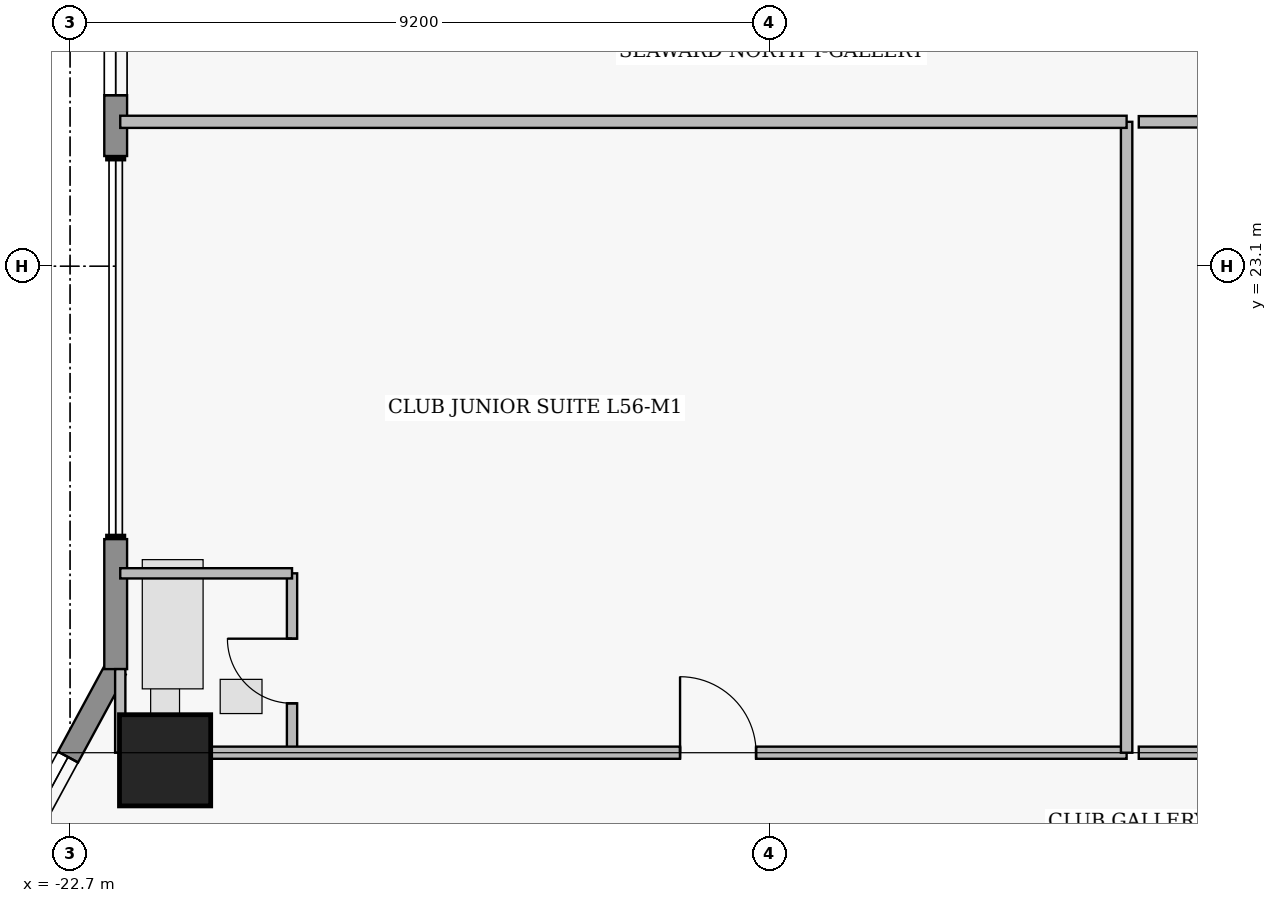
"""IFC4 building model, lengths in metres.
Left out: names, types, materials, properties, quantities, classifications, styles, units other than length and angle.
Written with IfcOpenShell. Run it as: python <this file> out.ifc"""

import sys

from ifc_helpers import new_model, si_unit, direction, frame, frame_2d, origin, origin_2d, place, context, subcontext, project, spatial, rectangle, extrude, element, fill, save


model = new_model("IFC4")
c1 = context("Model", 3, precision=1e-05, world=origin(), true_north=direction((0.0, 1.0)))
c2 = subcontext(c1, "Body", "Model", "MODEL_VIEW")
j1 = project(units=[si_unit("LENGTHUNIT", "METRE"), si_unit("PLANEANGLEUNIT", "RADIAN")], contexts=[c1])
p1 = place(None, origin())
s1 = spatial("IfcSite", under=j1, at=p1, CompositionType="ELEMENT")
p2 = place(p1, origin())
s2 = spatial("IfcBuilding", under=s1, at=p2, CompositionType="ELEMENT")
p3 = place(p2, frame((0.0, 0.0, 222.4)))
s3 = spatial("IfcBuildingStorey", under=s2, at=p3, CompositionType="ELEMENT", Elevation=222.4)
p4 = place(p3, frame((-21.45, 16.6, 0.0), z_axis=(0.0, 0.0, 1.0), x_axis=(1.0, 0.0, 0.0)))
e1 = element("IfcColumn", 1, at=p4, inside=s3, PredefinedType="COLUMN", context=c2, shape_type="SweptSolid", body=[
    extrude(rectangle(XDim=1.2, YDim=1.2, at=origin_2d()), origin(), (0.0, 0.0, 1.0), 3.75),
])
p5 = place(p3, frame((-24.7, 13.0, 0.0), z_axis=(0.0, 0.0, 1.0), x_axis=(0.476258655584, 0.879305233114, 0.0)))
e2 = element("IfcWall", 2, at=p5, inside=s3, PredefinedType="STANDARD", context=c2, shape_type="SweptSolid", body=[
    extrude(rectangle(XDim=5.459, YDim=0.3, at=frame_2d((2.729, 0.0))), origin(), (0.0, 0.0, 1.0), 3.53),
])
p6 = place(p5, frame((2.993, 0.0, 1.25)))
e3 = element("IfcOpeningElement", 3, at=p6, cuts=e2, PredefinedType="OPENING", context=c2, shape_type="SweptSolid", body=[
    extrude(rectangle(XDim=1.15, YDim=1.55, at=frame_2d((0.575, 0.775))), frame((0.0, 0.16, 0.0), z_axis=(0.0, -1.0, 0.0), x_axis=(1.0, 0.0, 0.0)), (0.0, 0.0, 1.0), 0.32),
])
p7 = place(p3, frame((-22.1, 17.8, 0.0), z_axis=(0.0, 0.0, 1.0), x_axis=(0.0, 1.0, 0.0)))
e4 = element("IfcWall", 4, at=p7, inside=s3, PredefinedType="STANDARD", context=c2, shape_type="SweptSolid", body=[
    extrude(rectangle(XDim=1.71, YDim=0.3, at=frame_2d((0.855, 0.0))), origin(), (0.0, 0.0, 1.0), 3.53),
])
p8 = place(p3, frame((-22.1, 24.55, 0.0), z_axis=(0.0, 0.0, 1.0), x_axis=(0.0, 1.0, 0.0)))
e5 = element("IfcWall", 5, at=p8, inside=s3, PredefinedType="STANDARD", context=c2, shape_type="SweptSolid", body=[
    extrude(rectangle(XDim=5.65, YDim=0.3, at=frame_2d((2.825, 0.0))), origin(), (0.0, 0.0, 1.0), 3.53),
])
p9 = place(p8, frame((0.8, 0.0, 0.95)))
e6 = element("IfcOpeningElement", 6, at=p9, cuts=e5, PredefinedType="OPENING", context=c2, shape_type="SweptSolid", body=[
    extrude(rectangle(XDim=1.15, YDim=1.55, at=frame_2d((0.575, 0.775))), frame((0.0, 0.16, 0.0), z_axis=(0.0, -1.0, 0.0), x_axis=(1.0, 0.0, 0.0)), (0.0, 0.0, 1.0), 0.32),
])
p10 = place(p8, frame((2.905, 0.0, 0.95)))
e7 = element("IfcOpeningElement", 7, at=p10, cuts=e5, PredefinedType="OPENING", context=c2, shape_type="SweptSolid", body=[
    extrude(rectangle(XDim=1.15, YDim=1.55, at=frame_2d((0.575, 0.775))), frame((0.0, 0.16, 0.0), z_axis=(0.0, -1.0, 0.0), x_axis=(1.0, 0.0, 0.0)), (0.0, 0.0, 1.0), 0.32),
])
p11 = place(p3, frame((-19.78, 16.7, 0.0), z_axis=(0.0, 0.0, 1.0), x_axis=(0.0, 1.0, 0.0)))
e8 = element("IfcWall", 8, at=p11, inside=s3, PredefinedType="PLUMBINGWALL", context=c2, shape_type="SweptSolid", body=[
    extrude(rectangle(XDim=2.36, YDim=0.135, at=frame_2d((1.18, 0.0))), origin(), (0.0, 0.0, 1.0), 3.53),
])
p12 = place(p11, frame((0.65, 0.0, 0.0)))
e9 = element("IfcOpeningElement", 9, at=p12, cuts=e8, PredefinedType="OPENING", context=c2, shape_type="SweptSolid", body=[
    extrude(rectangle(XDim=0.85, YDim=2.1, at=frame_2d((0.425, 1.05))), frame((0.0, 0.077, 0.0), z_axis=(0.0, -1.0, 0.0), x_axis=(1.0, 0.0, 0.0)), (0.0, 0.0, 1.0), 0.155),
])
p13 = place(p3, frame((-22.04, 16.7, 0.0), z_axis=(0.0, 0.0, 1.0), x_axis=(1.0, 0.0, 0.0)))
e10 = element("IfcWall", 10, at=p13, inside=s3, PredefinedType="PARTITIONING", context=c2, shape_type="SweptSolid", body=[
    extrude(rectangle(XDim=13.24, YDim=0.16, at=frame_2d((6.62, 0.0))), origin(), (0.0, 0.0, 1.0), 3.124),
])
p14 = place(p13, frame((7.365, 0.0, 0.0)))
e11 = element("IfcOpeningElement", 11, at=p14, cuts=e10, PredefinedType="OPENING", context=c2, shape_type="SweptSolid", body=[
    extrude(rectangle(XDim=1.0, YDim=2.15, at=frame_2d((0.5, 1.075))), frame((0.0, 0.09, 0.0), z_axis=(0.0, -1.0, 0.0), x_axis=(1.0, 0.0, 0.0)), (0.0, 0.0, 1.0), 0.18),
])
p15 = place(p3, frame((-8.64, 16.7, 0.0), z_axis=(0.0, 0.0, 1.0), x_axis=(1.0, 0.0, 0.0)))
e12 = element("IfcWall", 12, at=p15, inside=s3, PredefinedType="PARTITIONING", context=c2, shape_type="SweptSolid", body=[
    extrude(rectangle(XDim=7.66, YDim=0.16, at=frame_2d((3.83, 0.0))), origin(), (0.0, 0.0, 1.0), 3.124),
])
p16 = place(p15, frame((5.85, 0.0, 0.0)))
e13 = element("IfcOpeningElement", 13, at=p16, cuts=e12, PredefinedType="OPENING", context=c2, shape_type="SweptSolid", body=[
    extrude(rectangle(XDim=1.08, YDim=2.18, at=frame_2d((0.54, 1.09))), frame((0.0, 0.09, 0.0), z_axis=(0.0, -1.0, 0.0), x_axis=(1.0, 0.0, 0.0)), (0.0, 0.0, 1.0), 0.18),
])
p17 = place(p3, frame((-22.04, 19.06, 0.0), z_axis=(0.0, 0.0, 1.0), x_axis=(1.0, 0.0, 0.0)))
e14 = element("IfcWall", 14, at=p17, inside=s3, PredefinedType="PLUMBINGWALL", context=c2, shape_type="SweptSolid", body=[
    extrude(rectangle(XDim=2.26, YDim=0.135, at=frame_2d((1.13, 0.0))), origin(), (0.0, 0.0, 1.0), 3.53),
])
p18 = place(p3, frame((-22.04, 16.7, 0.0), z_axis=(0.0, 0.0, 1.0), x_axis=(0.0, 1.0, 0.0)))
e15 = element("IfcWall", 15, at=p18, inside=s3, PredefinedType="PLUMBINGWALL", context=c2, shape_type="SweptSolid", body=[
    extrude(rectangle(XDim=1.1, YDim=0.135, at=frame_2d((0.55, 0.0))), origin(), (0.0, 0.0, 1.0), 3.53),
])
p19 = place(p3, frame((-8.8, 16.7, 0.0), z_axis=(0.0, 0.0, 1.0), x_axis=(0.0, 1.0, 0.0)))
e16 = element("IfcWall", 16, at=p19, inside=s3, PredefinedType="PARTITIONING", context=c2, shape_type="SweptSolid", body=[
    extrude(rectangle(XDim=8.3, YDim=0.15, at=frame_2d((4.15, 0.0))), origin(), (0.0, 0.0, 1.0), 3.53),
])
p20 = place(p3, frame((-22.04, 25.0, 0.0), z_axis=(0.0, 0.0, 1.0), x_axis=(1.0, 0.0, 0.0)))
e17 = element("IfcWall", 17, at=p20, inside=s3, PredefinedType="PARTITIONING", context=c2, shape_type="SweptSolid", body=[
    extrude(rectangle(XDim=13.24, YDim=0.16, at=frame_2d((6.62, 0.0))), origin(), (0.0, 0.0, 1.0), 3.124),
])
p21 = place(p3, frame((-8.64, 25.0, 0.0), z_axis=(0.0, 0.0, 1.0), x_axis=(1.0, 0.0, 0.0)))
e18 = element("IfcWall", 18, at=p21, inside=s3, PredefinedType="PARTITIONING", context=c2, shape_type="SweptSolid", body=[
    extrude(rectangle(XDim=7.66, YDim=0.15, at=frame_2d((3.83, 0.0))), origin(), (0.0, 0.0, 1.0), 3.124),
])
p22 = place(p6, origin())
e19 = element("IfcWindow", 19, at=p22, inside=s3, PartitioningType="SINGLE_PANEL", PredefinedType="WINDOW", context=c2, shape_type="SweptSolid", body=[
    extrude(rectangle(XDim=1.15, YDim=1.55, at=frame_2d((0.575, 0.775))), frame((0.0, 0.03, 0.0), z_axis=(0.0, -1.0, 0.0), x_axis=(1.0, 0.0, 0.0)), (0.0, 0.0, 1.0), 0.06),
])
fill(e3, e19)
p23 = place(p9, origin())
e20 = element("IfcWindow", 20, at=p23, inside=s3, PartitioningType="SINGLE_PANEL", PredefinedType="WINDOW", context=c2, shape_type="SweptSolid", body=[
    extrude(rectangle(XDim=1.15, YDim=1.55, at=frame_2d((0.575, 0.775))), frame((0.0, 0.03, 0.0), z_axis=(0.0, -1.0, 0.0), x_axis=(1.0, 0.0, 0.0)), (0.0, 0.0, 1.0), 0.06),
])
fill(e6, e20)
p24 = place(p12, origin())
e21 = element("IfcDoor", 21, at=p24, inside=s3, OperationType="SINGLE_SWING_RIGHT", PredefinedType="DOOR", context=c2, shape_type="SweptSolid", body=[
    extrude(rectangle(XDim=0.85, YDim=2.1, at=frame_2d((0.425, 1.05))), frame((0.0, 0.025, 0.0), z_axis=(0.0, -1.0, 0.0), x_axis=(1.0, 0.0, 0.0)), (0.0, 0.0, 1.0), 0.05),
])
fill(e9, e21)
p25 = place(p14, origin())
e22 = element("IfcDoor", 22, at=p25, inside=s3, OperationType="SINGLE_SWING_LEFT", PredefinedType="DOOR", context=c2, shape_type="SweptSolid", body=[
    extrude(rectangle(XDim=1.0, YDim=2.15, at=frame_2d((0.5, 1.075))), frame((0.0, 0.025, 0.0), z_axis=(0.0, -1.0, 0.0), x_axis=(1.0, 0.0, 0.0)), (0.0, 0.0, 1.0), 0.05),
])
fill(e11, e22)
save(model, sys.argv[1])
